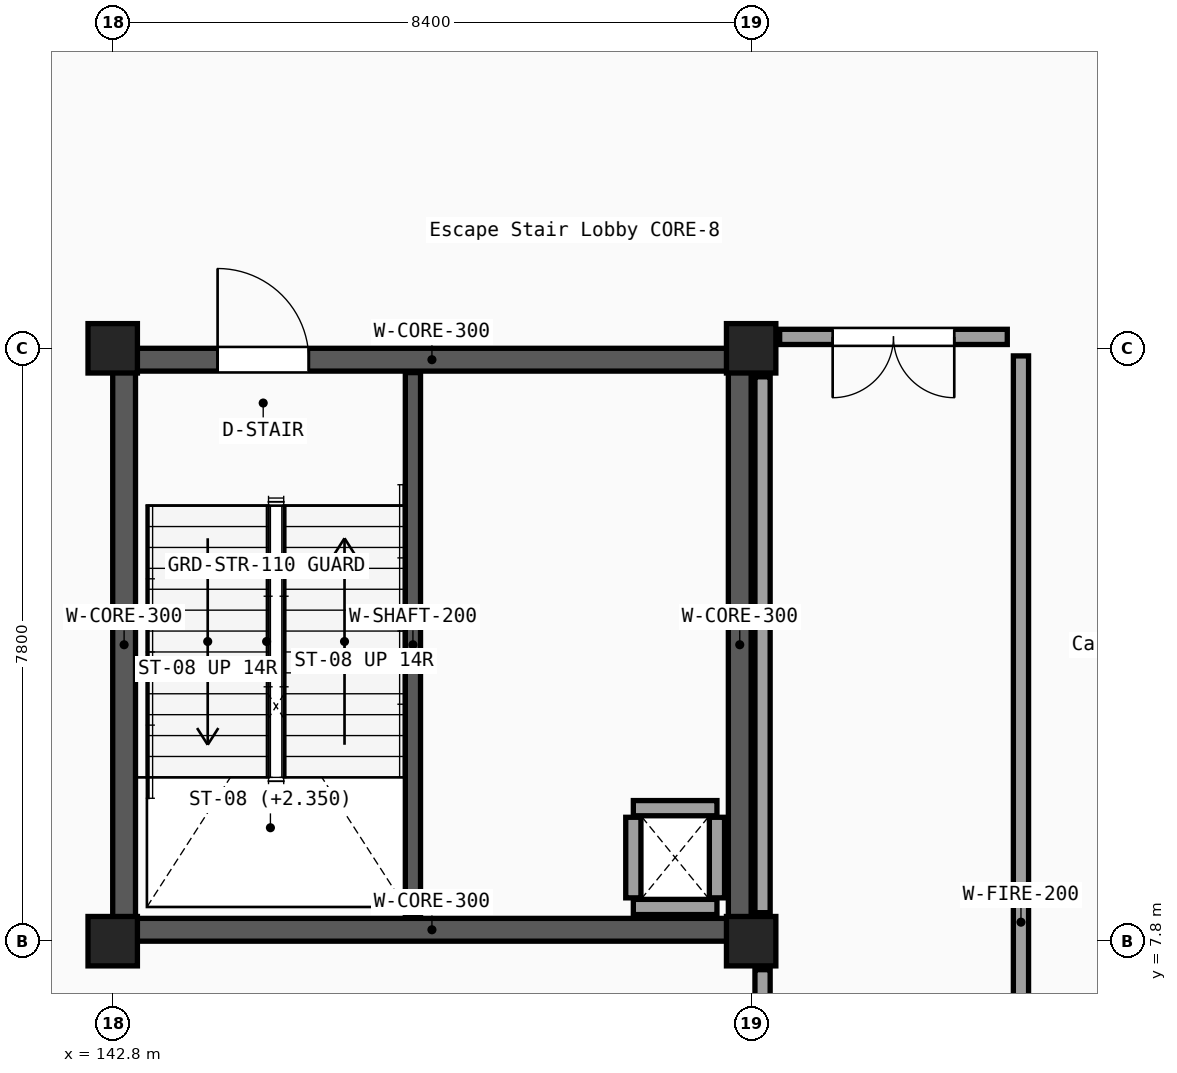
"""IFC4 building model, lengths in metres.
Left out: names, types, materials, properties, quantities, classifications, styles, units other than length and angle.
Written with IfcOpenShell. Run it as: python <this file> out.ifc"""

import sys

from ifc_helpers import new_model, si_unit, direction, frame, frame_2d, origin, origin_2d, place, context, subcontext, project, spatial, rectangle, extrude, element, fill, save


model = new_model("IFC4")
c1 = context("Model", 3, precision=1e-05, world=origin(), true_north=direction((0.0, 1.0)))
c2 = subcontext(c1, "Body", "Model", "MODEL_VIEW")
j1 = project(units=[si_unit("LENGTHUNIT", "METRE"), si_unit("PLANEANGLEUNIT", "RADIAN")], contexts=[c1])
p1 = place(None, origin())
s1 = spatial("IfcSite", under=j1, at=p1, CompositionType="ELEMENT")
p2 = place(p1, origin())
s2 = spatial("IfcBuilding", under=s1, at=p2, CompositionType="ELEMENT")
p3 = place(p2, origin())
s3 = spatial("IfcBuildingStorey", under=s2, at=p3, CompositionType="ELEMENT", Elevation=0.0)
for number, where, z_axis, x_axis in (
    (1, (142.8, 7.8, 0.0), (0.0, 0.0, 1.0), (1.0, 0.0, 0.0)),
    (2, (142.8, 15.6, 0.0), (0.0, 0.0, 1.0), (1.0, 0.0, 0.0)),
    (3, (151.2, 7.8, 0.0), (0.0, 0.0, 1.0), (1.0, 0.0, 0.0)),
    (4, (151.2, 15.6, 0.0), (0.0, 0.0, 1.0), (1.0, 0.0, 0.0)),
):
    element("IfcColumn", number, at=place(p3, frame(where, z_axis=z_axis, x_axis=x_axis)), inside=s3, PredefinedType="COLUMN", context=c2, shape_type="SweptSolid", body=[
        extrude(rectangle(XDim=0.65, YDim=0.65, at=origin_2d()), origin(), (0.0, 0.0, 1.0), 5.1),
    ])
p4 = place(p3, frame((142.8, 7.95, 0.0), z_axis=(0.0, 0.0, 1.0), x_axis=(1.0, 0.0, 0.0)))
e5 = element("IfcWall", 5, at=p4, inside=s3, PredefinedType="SHEAR", context=c2, shape_type="SweptSolid", body=[
    extrude(rectangle(XDim=8.4, YDim=0.3, at=frame_2d((4.2, 0.0))), origin(), (0.0, 0.0, 1.0), 4.87),
])
p5 = place(p3, frame((142.8, 15.45, 0.0), z_axis=(0.0, 0.0, 1.0), x_axis=(1.0, 0.0, 0.0)))
e6 = element("IfcWall", 6, at=p5, inside=s3, PredefinedType="SHEAR", context=c2, shape_type="SweptSolid", body=[
    extrude(rectangle(XDim=8.4, YDim=0.3, at=frame_2d((4.2, 0.0))), origin(), (0.0, 0.0, 1.0), 4.87),
])
p6 = place(p5, frame((1.38, 0.0, 0.0)))
e7 = element("IfcOpeningElement", 7, at=p6, cuts=e6, PredefinedType="OPENING", context=c2, shape_type="SweptSolid", body=[
    extrude(rectangle(XDim=1.2, YDim=2.15, at=frame_2d((0.6, 1.075))), frame((0.0, 0.16, 0.0), z_axis=(0.0, -1.0, 0.0), x_axis=(1.0, 0.0, 0.0)), (0.0, 0.0, 1.0), 0.32),
])
for number, where, z_axis, x_axis in (
    (8, (142.95, 8.1, 0.0), (0.0, 0.0, 1.0), (0.0, 1.0, 0.0)),
    (9, (151.05, 8.1, 0.0), (0.0, 0.0, 1.0), (0.0, 1.0, 0.0)),
):
    element("IfcWall", number, at=place(p3, frame(where, z_axis=z_axis, x_axis=x_axis)), inside=s3, PredefinedType="SHEAR", context=c2, shape_type="SweptSolid", body=[
        extrude(rectangle(XDim=7.2, YDim=0.3, at=frame_2d((3.6, 0.0))), origin(), (0.0, 0.0, 1.0), 4.87),
    ])
p7 = place(p3, frame((146.75, 8.12, 0.0), z_axis=(0.0, 0.0, 1.0), x_axis=(0.0, 1.0, 0.0)))
e10 = element("IfcWall", 10, at=p7, inside=s3, PredefinedType="SHEAR", context=c2, shape_type="SweptSolid", body=[
    extrude(rectangle(XDim=7.16, YDim=0.2, at=frame_2d((3.58, 0.0))), origin(), (0.0, 0.0, 1.0), 4.87),
])
for number, where, z_axis, x_axis in (
    (11, (149.65, 8.25, 0.0), (0.0, 0.0, 1.0), (1.0, 0.0, 0.0)),
    (12, (149.65, 9.55, 0.0), (0.0, 0.0, 1.0), (1.0, 0.0, 0.0)),
):
    element("IfcWall", number, at=place(p3, frame(where, z_axis=z_axis, x_axis=x_axis)), inside=s3, PredefinedType="PARTITIONING", context=c2, shape_type="SweptSolid", body=[
        extrude(rectangle(XDim=1.1, YDim=0.2, at=frame_2d((0.55, 0.0))), origin(), (0.0, 0.0, 1.0), 4.25),
    ])
for number, where, z_axis, x_axis in (
    (13, (149.65, 8.37, 0.0), (0.0, 0.0, 1.0), (0.0, 1.0, 0.0)),
    (14, (150.75, 8.37, 0.0), (0.0, 0.0, 1.0), (0.0, 1.0, 0.0)),
):
    element("IfcWall", number, at=place(p3, frame(where, z_axis=z_axis, x_axis=x_axis)), inside=s3, PredefinedType="PARTITIONING", context=c2, shape_type="SweptSolid", body=[
        extrude(rectangle(XDim=1.06, YDim=0.2, at=frame_2d((0.53, 0.0))), origin(), (0.0, 0.0, 1.0), 4.25),
    ])
p8 = place(p3, frame((151.35, 0.6, 0.0), z_axis=(0.0, 0.0, 1.0), x_axis=(0.0, 1.0, 0.0)))
e15 = element("IfcWall", 15, at=p8, inside=s3, PredefinedType="PARTITIONING", context=c2, shape_type="SweptSolid", body=[
    extrude(rectangle(XDim=6.825, YDim=0.2, at=frame_2d((3.413, 0.0))), origin(), (0.0, 0.0, 1.0), 4.45),
])
p9 = place(p3, frame((151.35, 8.175, 0.0), z_axis=(0.0, 0.0, 1.0), x_axis=(0.0, 1.0, 0.0)))
e16 = element("IfcWall", 16, at=p9, inside=s3, PredefinedType="PARTITIONING", context=c2, shape_type="SweptSolid", body=[
    extrude(rectangle(XDim=7.05, YDim=0.2, at=frame_2d((3.525, 0.0))), origin(), (0.0, 0.0, 1.0), 4.45),
])
p10 = place(p3, frame((154.75, 0.6, 0.0), z_axis=(0.0, 0.0, 1.0), x_axis=(0.0, 1.0, 0.0)))
e17 = element("IfcWall", 17, at=p10, inside=s3, PredefinedType="PARTITIONING", context=c2, shape_type="SweptSolid", body=[
    extrude(rectangle(XDim=14.9, YDim=0.2, at=frame_2d((7.45, 0.0))), origin(), (0.0, 0.0, 1.0), 4.35),
])
p11 = place(p3, frame((151.575, 15.75, 0.0), z_axis=(0.0, 0.0, 1.0), x_axis=(1.0, 0.0, 0.0)))
e18 = element("IfcWall", 18, at=p11, inside=s3, PredefinedType="PARTITIONING", context=c2, shape_type="SweptSolid", body=[
    extrude(rectangle(XDim=2.995, YDim=0.2, at=frame_2d((1.498, 0.0))), origin(), (0.0, 0.0, 1.0), 4.35),
])
p12 = place(p11, frame((0.698, 0.0, 0.0)))
e19 = element("IfcOpeningElement", 19, at=p12, cuts=e18, PredefinedType="OPENING", context=c2, shape_type="SweptSolid", body=[
    extrude(rectangle(XDim=1.6, YDim=2.2, at=frame_2d((0.8, 1.1))), frame((0.0, 0.11, 0.0), z_axis=(0.0, -1.0, 0.0), x_axis=(1.0, 0.0, 0.0)), (0.0, 0.0, 1.0), 0.22),
])
p13 = place(p6, origin())
e20 = element("IfcDoor", 20, at=p13, inside=s3, OperationType="SINGLE_SWING_LEFT", PredefinedType="DOOR", context=c2, shape_type="SweptSolid", body=[
    extrude(rectangle(XDim=1.2, YDim=2.15, at=frame_2d((0.6, 1.075))), frame((0.0, 0.025, 0.0), z_axis=(0.0, -1.0, 0.0), x_axis=(1.0, 0.0, 0.0)), (0.0, 0.0, 1.0), 0.05),
])
fill(e7, e20)
p14 = place(p12, frame((1.6, 0.0, 0.0), z_axis=(0.0, 0.0, 1.0), x_axis=(-1.0, 0.0, 0.0)))
e21 = element("IfcDoor", 21, at=p14, inside=s3, OperationType="DOUBLE_DOOR_SINGLE_SWING", PredefinedType="DOOR", context=c2, shape_type="SweptSolid", body=[
    extrude(rectangle(XDim=1.6, YDim=2.2, at=frame_2d((0.8, 1.1))), frame((0.0, 0.025, 0.0), z_axis=(0.0, -1.0, 0.0), x_axis=(1.0, 0.0, 0.0)), (0.0, 0.0, 1.0), 0.05),
])
fill(e19, e21)
save(model, sys.argv[1])
